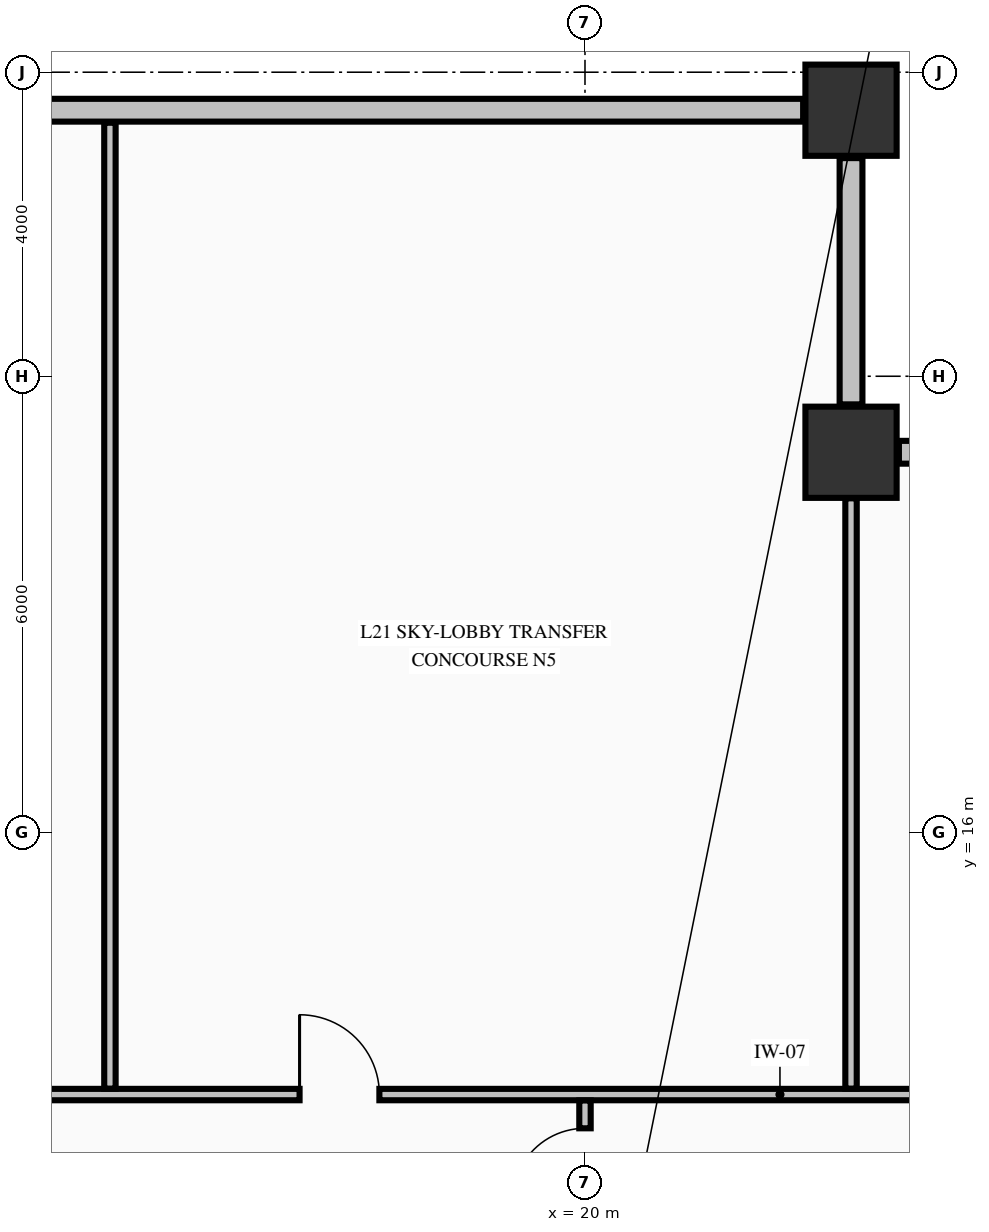
"""IFC4 building model, lengths in metres.
Left out: names, types, materials, properties, quantities, classifications, styles, units other than length and angle.
Written with IfcOpenShell. Run it as: python <this file> out.ifc"""

import sys

from ifc_helpers import new_model, si_unit, direction, frame, frame_2d, origin, origin_2d, place, context, subcontext, project, spatial, rectangle, extrude, element, fill, save


model = new_model("IFC4")
c1 = context("Model", 3, precision=1e-05, world=origin(), true_north=direction((0.0, 1.0)))
c2 = subcontext(c1, "Body", "Model", "MODEL_VIEW")
j1 = project(units=[si_unit("LENGTHUNIT", "METRE"), si_unit("PLANEANGLEUNIT", "RADIAN")], contexts=[c1])
p1 = place(None, origin())
s1 = spatial("IfcSite", under=j1, at=p1, CompositionType="ELEMENT")
p2 = place(p1, origin())
s2 = spatial("IfcBuilding", under=s1, at=p2, CompositionType="ELEMENT")
p3 = place(p2, frame((0.0, 0.0, 86.94)))
s3 = spatial("IfcBuildingStorey", under=s2, at=p3, CompositionType="ELEMENT", Elevation=86.94)
for number, where, z_axis, x_axis in (
    (1, (23.5, 25.5, -0.425), (0.0, 0.0, 1.0), (1.0, 0.0, 0.0)),
    (2, (23.5, 21.0, -0.425), (0.0, 0.0, 1.0), (1.0, 0.0, 0.0)),
):
    element("IfcColumn", number, at=place(p3, frame(where, z_axis=z_axis, x_axis=x_axis)), inside=s3, PredefinedType="COLUMN", context=c2, shape_type="SweptSolid", body=[
        extrude(rectangle(XDim=1.2, YDim=1.2, at=origin_2d()), origin(), (0.0, 0.0, 1.0), 4.595),
    ])
for number, where, z_axis, x_axis in (
    (3, (27.37, 21.0, 0.0), (0.0, 0.0, 1.0), (-1.0, 0.0, 0.0)),
    (4, (23.5, 21.63, 0.0), (0.0, 0.0, 1.0), (0.0, 1.0, 0.0)),
):
    element("IfcWall", number, at=place(p3, frame(where, z_axis=z_axis, x_axis=x_axis)), inside=s3, PredefinedType="STANDARD", context=c2, shape_type="SweptSolid", body=[
        extrude(rectangle(XDim=3.24, YDim=0.3, at=frame_2d((1.62, 0.0))), origin(), (0.0, 0.0, 1.0), 2.362),
    ])
p4 = place(p3, frame((22.87, 25.5, 0.0), z_axis=(0.0, 0.0, 1.0), x_axis=(-1.0, 0.0, 0.0)))
e5 = element("IfcWall", 5, at=p4, inside=s3, PredefinedType="STANDARD", context=c2, shape_type="SweptSolid", body=[
    extrude(rectangle(XDim=11.24, YDim=0.3, at=frame_2d((5.62, 0.0))), origin(), (0.0, 0.0, 1.0), 1.962),
])
p5 = place(p3, frame((-22.835, 12.55, 0.0), z_axis=(0.0, 0.0, 1.0), x_axis=(1.0, 0.0, 0.0)))
e6 = element("IfcWall", 6, at=p5, inside=s3, PredefinedType="PARTITIONING", context=c2, shape_type="SweptSolid", body=[
    extrude(rectangle(XDim=50.67, YDim=0.15, at=frame_2d((25.335, 0.0))), origin(), (0.0, 0.0, 1.0), 4.17),
])
p6 = place(p5, frame((8.93, 0.0, 0.0)))
e7 = element("IfcOpeningElement", 7, at=p6, cuts=e6, PredefinedType="OPENING", context=c2, shape_type="SweptSolid", body=[
    extrude(rectangle(XDim=1.05, YDim=2.15, at=frame_2d((0.525, 1.075))), frame((0.0, 0.085, 0.0), z_axis=(0.0, -1.0, 0.0), x_axis=(1.0, 0.0, 0.0)), (0.0, 0.0, 1.0), 0.17),
])
p7 = place(p5, frame((18.66, 0.0, 0.0)))
e8 = element("IfcOpeningElement", 8, at=p7, cuts=e6, PredefinedType="OPENING", context=c2, shape_type="SweptSolid", body=[
    extrude(rectangle(XDim=1.05, YDim=2.15, at=frame_2d((0.525, 1.075))), frame((0.0, 0.085, 0.0), z_axis=(0.0, -1.0, 0.0), x_axis=(1.0, 0.0, 0.0)), (0.0, 0.0, 1.0), 0.17),
])
p8 = place(p5, frame((26.71, 0.0, 0.0)))
e9 = element("IfcOpeningElement", 9, at=p8, cuts=e6, PredefinedType="OPENING", context=c2, shape_type="SweptSolid", body=[
    extrude(rectangle(XDim=0.95, YDim=2.15, at=frame_2d((0.475, 1.075))), frame((0.0, 0.085, 0.0), z_axis=(0.0, -1.0, 0.0), x_axis=(1.0, 0.0, 0.0)), (0.0, 0.0, 1.0), 0.17),
])
p9 = place(p5, frame((34.46, 0.0, 0.0)))
e10 = element("IfcOpeningElement", 10, at=p9, cuts=e6, PredefinedType="OPENING", context=c2, shape_type="SweptSolid", body=[
    extrude(rectangle(XDim=0.95, YDim=2.15, at=frame_2d((0.475, 1.075))), frame((0.0, 0.085, 0.0), z_axis=(0.0, -1.0, 0.0), x_axis=(1.0, 0.0, 0.0)), (0.0, 0.0, 1.0), 0.17),
])
p10 = place(p5, frame((39.08, 0.0, 0.0)))
e11 = element("IfcOpeningElement", 11, at=p10, cuts=e6, PredefinedType="OPENING", context=c2, shape_type="SweptSolid", body=[
    extrude(rectangle(XDim=1.05, YDim=2.15, at=frame_2d((0.525, 1.075))), frame((0.0, 0.085, 0.0), z_axis=(0.0, -1.0, 0.0), x_axis=(1.0, 0.0, 0.0)), (0.0, 0.0, 1.0), 0.17),
])
p11 = place(p3, frame((13.75, 12.628, 0.0), z_axis=(0.0, 0.0, 1.0), x_axis=(0.0, 1.0, 0.0)))
e12 = element("IfcWall", 12, at=p11, inside=s3, PredefinedType="PARTITIONING", context=c2, shape_type="SweptSolid", body=[
    extrude(rectangle(XDim=12.707, YDim=0.15, at=frame_2d((6.354, 0.0))), origin(), (0.0, 0.0, 1.0), 4.17),
])
p12 = place(p3, frame((20.0, 11.006, 0.0), z_axis=(0.0, 0.0, 1.0), x_axis=(0.0, 1.0, 0.0)))
e13 = element("IfcWall", 13, at=p12, inside=s3, PredefinedType="PARTITIONING", context=c2, shape_type="SweptSolid", body=[
    extrude(rectangle(XDim=1.466, YDim=0.15, at=frame_2d((0.733, 0.0))), origin(), (0.0, 0.0, 1.0), 3.36),
])
p13 = place(p12, frame((0.15, 0.0, 0.0)))
e14 = element("IfcOpeningElement", 14, at=p13, cuts=e13, PredefinedType="OPENING", context=c2, shape_type="SweptSolid", body=[
    extrude(rectangle(XDim=0.95, YDim=2.15, at=frame_2d((0.475, 1.075))), frame((0.0, 0.085, 0.0), z_axis=(0.0, -1.0, 0.0), x_axis=(1.0, 0.0, 0.0)), (0.0, 0.0, 1.0), 0.17),
])
p14 = place(p3, frame((23.5, 12.628, 0.0), z_axis=(0.0, 0.0, 1.0), x_axis=(0.0, 1.0, 0.0)))
e15 = element("IfcWall", 15, at=p14, inside=s3, PredefinedType="PARTITIONING", context=c2, shape_type="SweptSolid", body=[
    extrude(rectangle(XDim=7.766, YDim=0.15, at=frame_2d((3.883, 0.0))), origin(), (0.0, 0.0, 1.0), 4.17),
])
p15 = place(p10, origin())
e16 = element("IfcDoor", 16, at=p15, inside=s3, OperationType="SINGLE_SWING_LEFT", PredefinedType="DOOR", context=c2, shape_type="SweptSolid", body=[
    extrude(rectangle(XDim=1.05, YDim=2.15, at=frame_2d((0.525, 1.075))), frame((0.0, 0.025, 0.0), z_axis=(0.0, -1.0, 0.0), x_axis=(1.0, 0.0, 0.0)), (0.0, 0.0, 1.0), 0.05),
])
fill(e11, e16)
p16 = place(p13, origin())
e17 = element("IfcDoor", 17, at=p16, inside=s3, OperationType="SINGLE_SWING_LEFT", PredefinedType="DOOR", context=c2, shape_type="SweptSolid", body=[
    extrude(rectangle(XDim=0.95, YDim=2.15, at=frame_2d((0.475, 1.075))), frame((0.0, 0.025, 0.0), z_axis=(0.0, -1.0, 0.0), x_axis=(1.0, 0.0, 0.0)), (0.0, 0.0, 1.0), 0.05),
])
fill(e14, e17)
save(model, sys.argv[1])
